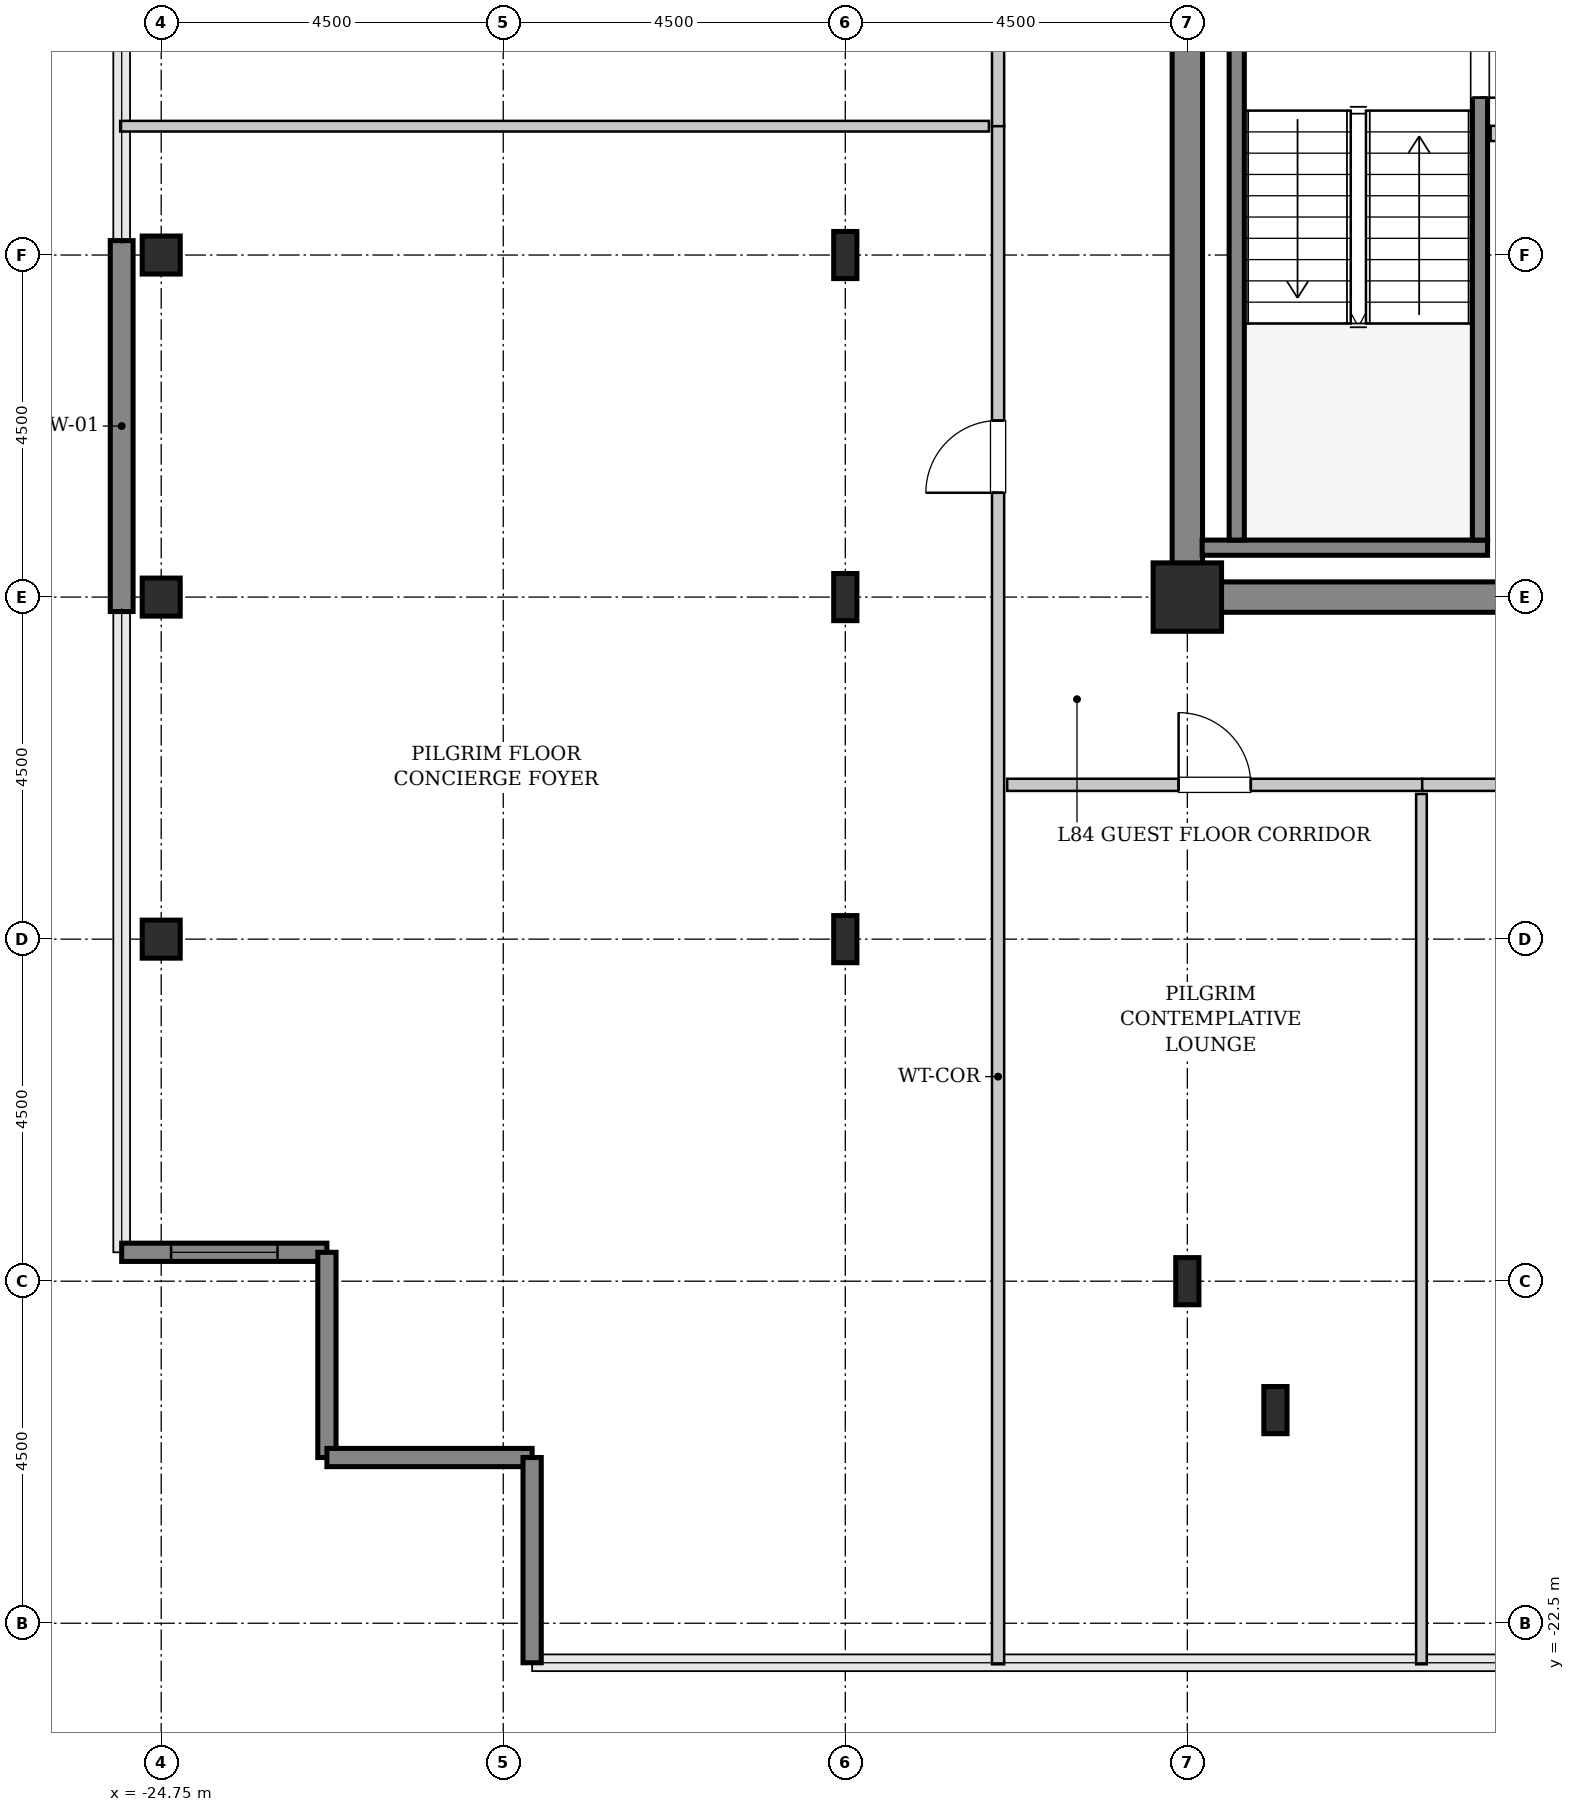
"""IFC4 building model, lengths in metres.
Left out: names, types, materials, properties, quantities, classifications, styles, units other than length and angle.
Written with IfcOpenShell. Run it as: python <this file> out.ifc"""

import sys

from ifc_helpers import new_model, si_unit, direction, frame, frame_2d, origin, origin_2d, place, context, subcontext, project, spatial, rectangle, hollow_rectangle, i_section, extrude, source, transform, mapped, element, fill, save


model = new_model("IFC4")
c1 = context("Model", 3, precision=1e-05, world=origin(), true_north=direction((0.0, 1.0)))
c2 = subcontext(c1, "Body", "Model", "MODEL_VIEW")
j1 = project(units=[si_unit("LENGTHUNIT", "METRE"), si_unit("PLANEANGLEUNIT", "RADIAN")], contexts=[c1])
p1 = place(None, origin())
s1 = spatial("IfcSite", under=j1, at=p1, CompositionType="ELEMENT")
p2 = place(p1, origin())
s2 = spatial("IfcBuilding", under=s1, at=p2, CompositionType="ELEMENT")
p3 = place(p2, frame((0.0, 0.0, 333.8)))
s3 = spatial("IfcBuildingStorey", under=s2, at=p3, CompositionType="ELEMENT", Elevation=333.8)
m1 = source(origin(), c2, "Body", "SweptSolid", [
    extrude(rectangle(XDim=9.9, YDim=0.4, at=frame_2d((4.95, 0.0))), origin(), (0.0, 0.0, 1.0), 3.8),
])
p4 = place(p3, frame((-11.45, -9.0, 0.0), z_axis=(0.0, 0.0, 1.0), x_axis=(1.0, 0.0, 0.0)))
e1 = element("IfcWall", 1, at=p4, inside=s3, PredefinedType="SHEAR", context=c2, shape_type="MappedRepresentation", body=[
    mapped(m1, transform((0.0, 0.0, 0.0), x_axis=(1.0, 0.0, 0.0), y_axis=(0.0, 1.0, 0.0), z_axis=(0.0, 0.0, 1.0), scale=1.0)),
])
m2 = source(origin(), c2, "Body", "SweptSolid", [
    extrude(rectangle(XDim=7.45, YDim=0.4, at=frame_2d((3.725, 0.0))), origin(), (0.0, 0.0, 1.0), 3.8),
])
p5 = place(p3, frame((-11.25, -8.8, 0.0), z_axis=(0.0, 0.0, 1.0), x_axis=(0.0, 1.0, 0.0)))
e2 = element("IfcWall", 2, at=p5, inside=s3, PredefinedType="SHEAR", context=c2, shape_type="MappedRepresentation", body=[
    mapped(m2, transform((0.0, 0.0, 0.0), x_axis=(1.0, 0.0, 0.0), y_axis=(0.0, 1.0, 0.0), z_axis=(0.0, 0.0, 1.0), scale=1.0)),
])
m3 = source(origin(), c2, "Body", "SweptSolid", [
    extrude(hollow_rectangle(XDim=0.5, YDim=0.5, WallThickness=0.025, InnerFilletRadius=0.025, OuterFilletRadius=0.05, at=origin_2d()), origin(), (0.0, 0.0, 1.0), 3.8),
])
for number, where, z_axis, x_axis in (
    (3, (-24.75, -13.5, 0.0), (0.0, 0.0, 1.0), (1.0, 0.0, 0.0)),
    (4, (-24.75, -9.0, 0.0), (0.0, 0.0, 1.0), (1.0, 0.0, 0.0)),
    (5, (-24.75, -4.5, 0.0), (0.0, 0.0, 1.0), (1.0, 0.0, 0.0)),
):
    element("IfcColumn", number, at=place(p3, frame(where, z_axis=z_axis, x_axis=x_axis)), inside=s3, PredefinedType="COLUMN", context=c2, shape_type="MappedRepresentation", body=[
        mapped(m3, transform((0.0, 0.0, 0.0), x_axis=(1.0, 0.0, 0.0), y_axis=(0.0, 1.0, 0.0), z_axis=(0.0, 0.0, 1.0), scale=1.0)),
    ])
m4 = source(origin(), c2, "Body", "SweptSolid", [
    extrude(i_section(OverallWidth=0.305, OverallDepth=0.62, WebThickness=0.021, FlangeThickness=0.04, FilletRadius=0.027, at=origin_2d()), origin(), (0.0, 0.0, 1.0), 3.8),
])
for number, where, z_axis, x_axis in (
    (6, (-15.75, -13.5, 0.0), (0.0, 0.0, 1.0), (1.0, 0.0, 0.0)),
    (7, (-15.75, -9.0, 0.0), (0.0, 0.0, 1.0), (1.0, 0.0, 0.0)),
    (8, (-15.75, -4.5, 0.0), (0.0, 0.0, 1.0), (1.0, 0.0, 0.0)),
    (9, (-11.25, -18.0, 0.0), (0.0, 0.0, 1.0), (1.0, 0.0, 0.0)),
):
    element("IfcColumn", number, at=place(p3, frame(where, z_axis=z_axis, x_axis=x_axis)), inside=s3, PredefinedType="COLUMN", context=c2, shape_type="MappedRepresentation", body=[
        mapped(m4, transform((0.0, 0.0, 0.0), x_axis=(1.0, 0.0, 0.0), y_axis=(0.0, 1.0, 0.0), z_axis=(0.0, 0.0, 1.0), scale=1.0)),
    ])
m5 = source(origin(), c2, "Body", "SweptSolid", [
    extrude(rectangle(XDim=0.9, YDim=0.9, at=origin_2d()), origin(), (0.0, 0.0, 1.0), 3.8),
])
p6 = place(p3, frame((-11.25, -9.0, 0.0), z_axis=(0.0, 0.0, 1.0), x_axis=(1.0, 0.0, 0.0)))
e10 = element("IfcColumn", 10, at=p6, inside=s3, PredefinedType="COLUMN", context=c2, shape_type="MappedRepresentation", body=[
    mapped(m5, transform((0.0, 0.0, 0.0), x_axis=(1.0, 0.0, 0.0), y_axis=(0.0, 1.0, 0.0), z_axis=(0.0, 0.0, 1.0), scale=1.0)),
])
p7 = place(p3, frame((-10.091, -19.696, 0.0), z_axis=(0.0, 0.0, 1.0), x_axis=(1.0, 0.0, 0.0)))
e11 = element("IfcColumn", 11, at=p7, inside=s3, PredefinedType="COLUMN", context=c2, shape_type="MappedRepresentation", body=[
    mapped(m4, transform((0.0, 0.0, 0.0), x_axis=(1.0, 0.0, 0.0), y_axis=(0.0, 1.0, 0.0), z_axis=(0.0, 0.0, 1.0), scale=1.0)),
])
m6 = source(origin(), c2, "Body", "SweptSolid", [
    extrude(rectangle(XDim=4.88, YDim=0.3, at=frame_2d((2.44, 0.0))), origin(), (0.0, 0.0, 1.0), 3.55),
])
p8 = place(p3, frame((-25.27, -9.19, 0.0), z_axis=(0.0, 0.0, 1.0), x_axis=(0.0, 1.0, 0.0)))
e12 = element("IfcWall", 12, at=p8, inside=s3, PredefinedType="SHEAR", context=c2, shape_type="MappedRepresentation", body=[
    mapped(m6, transform((0.0, 0.0, 0.0), x_axis=(1.0, 0.0, 0.0), y_axis=(0.0, 1.0, 0.0), z_axis=(0.0, 0.0, 1.0), scale=1.0)),
])
m7 = source(origin(), c2, "Body", "SweptSolid", [
    extrude(rectangle(XDim=2.7, YDim=0.24, at=frame_2d((1.35, 0.0))), origin(), (0.0, 0.0, 1.0), 3.55),
])
p9 = place(p3, frame((-25.27, -17.62, 0.0), z_axis=(0.0, 0.0, 1.0), x_axis=(1.0, 0.0, 0.0)))
e13 = element("IfcWall", 13, at=p9, inside=s3, PredefinedType="SHEAR", context=c2, shape_type="MappedRepresentation", body=[
    mapped(m7, transform((0.0, 0.0, 0.0), x_axis=(1.0, 0.0, 0.0), y_axis=(0.0, 1.0, 0.0), z_axis=(0.0, 0.0, 1.0), scale=1.0)),
])
p10 = place(p9, frame((0.65, 0.0, 0.85)))
e14 = element("IfcOpeningElement", 14, at=p10, cuts=e13, PredefinedType="OPENING", context=c2, shape_type="SweptSolid", body=[
    extrude(rectangle(XDim=1.4, YDim=1.8, at=frame_2d((0.7, 0.9))), frame((0.0, 0.13, 0.0), z_axis=(0.0, -1.0, 0.0), x_axis=(1.0, 0.0, 0.0)), (0.0, 0.0, 1.0), 0.26),
])
for number, where, z_axis, x_axis in (
    (15, (-22.57, -17.62, 0.0), (0.0, 0.0, 1.0), (0.0, -1.0, 0.0)),
    (16, (-22.57, -20.32, 0.0), (0.0, 0.0, 1.0), (1.0, 0.0, 0.0)),
    (17, (-19.87, -20.32, 0.0), (0.0, 0.0, 1.0), (0.0, -1.0, 0.0)),
):
    element("IfcWall", number, at=place(p3, frame(where, z_axis=z_axis, x_axis=x_axis)), inside=s3, PredefinedType="SHEAR", context=c2, shape_type="MappedRepresentation", body=[
        mapped(m7, transform((0.0, 0.0, 0.0), x_axis=(1.0, 0.0, 0.0), y_axis=(0.0, 1.0, 0.0), z_axis=(0.0, 0.0, 1.0), scale=1.0)),
    ])
m8 = source(origin(), c2, "Body", "SweptSolid", [
    extrude(rectangle(XDim=3.755, YDim=0.2, at=frame_2d((1.877, 0.0))), origin(), (0.0, 0.0, 1.0), 3.8),
])
p11 = place(p3, frame((-11.055, -8.35, 0.0), z_axis=(0.0, 0.0, 1.0), x_axis=(1.0, 0.0, 0.0)))
e18 = element("IfcWall", 18, at=p11, inside=s3, PredefinedType="SOLIDWALL", context=c2, shape_type="MappedRepresentation", body=[
    mapped(m8, transform((0.0, 0.0, 0.0), x_axis=(1.0, 0.0, 0.0), y_axis=(0.0, 1.0, 0.0), z_axis=(0.0, 0.0, 1.0), scale=1.0)),
])
m9 = source(origin(), c2, "Body", "SweptSolid", [
    extrude(rectangle(XDim=7.1, YDim=0.2, at=frame_2d((3.55, 0.0))), origin(), (0.0, 0.0, 1.0), 3.8),
])
p12 = place(p3, frame((-10.6, -1.15, 0.0), z_axis=(0.0, 0.0, 1.0), x_axis=(0.0, -1.0, 0.0)))
e19 = element("IfcWall", 19, at=p12, inside=s3, PredefinedType="SOLIDWALL", context=c2, shape_type="MappedRepresentation", body=[
    mapped(m9, transform((0.0, 0.0, 0.0), x_axis=(1.0, 0.0, 0.0), y_axis=(0.0, 1.0, 0.0), z_axis=(0.0, 0.0, 1.0), scale=1.0)),
])
p13 = place(p3, frame((-7.4, -1.15, 0.0), z_axis=(0.0, 0.0, 1.0), x_axis=(0.0, -1.0, 0.0)))
e20 = element("IfcWall", 20, at=p13, inside=s3, PredefinedType="SOLIDWALL", context=c2, shape_type="MappedRepresentation", body=[
    mapped(m9, transform((0.0, 0.0, 0.0), x_axis=(1.0, 0.0, 0.0), y_axis=(0.0, 1.0, 0.0), z_axis=(0.0, 0.0, 1.0), scale=1.0)),
])
p14 = place(p13, frame((0.18, 0.0, 0.0)))
e21 = element("IfcOpeningElement", 21, at=p14, cuts=e20, PredefinedType="OPENING", context=c2, shape_type="SweptSolid", body=[
    extrude(rectangle(XDim=1.1, YDim=2.15, at=frame_2d((0.55, 1.075))), frame((0.0, 0.11, 0.0), z_axis=(0.0, -1.0, 0.0), x_axis=(1.0, 0.0, 0.0)), (0.0, 0.0, 1.0), 0.22),
])
m10 = source(origin(), c2, "Body", "SweptSolid", [
    extrude(rectangle(XDim=2.9, YDim=0.2, at=frame_2d((1.45, 0.0))), origin(), (0.0, 0.0, 1.0), 3.535),
])
p15 = place(p3, frame((-7.26, -2.9, 0.0), z_axis=(0.0, 0.0, 1.0), x_axis=(1.0, 0.0, 0.0)))
e22 = element("IfcWall", 22, at=p15, inside=s3, PredefinedType="PARTITIONING", context=c2, shape_type="MappedRepresentation", body=[
    mapped(m10, transform((0.0, 0.0, 0.0), x_axis=(1.0, 0.0, 0.0), y_axis=(0.0, 1.0, 0.0), z_axis=(0.0, 0.0, 1.0), scale=1.0)),
])
m11 = source(origin(), c2, "Body", "SweptSolid", [
    extrude(rectangle(XDim=20.245, YDim=0.16, at=frame_2d((10.123, 0.0))), origin(), (0.0, 0.0, 1.0), 3.535),
])
p16 = place(p3, frame((-13.74, -23.04, 0.0), z_axis=(0.0, 0.0, 1.0), x_axis=(0.0, 1.0, 0.0)))
e23 = element("IfcWall", 23, at=p16, inside=s3, PredefinedType="PARTITIONING", context=c2, shape_type="MappedRepresentation", body=[
    mapped(m11, transform((0.0, 0.0, 0.0), x_axis=(1.0, 0.0, 0.0), y_axis=(0.0, 1.0, 0.0), z_axis=(0.0, 0.0, 1.0), scale=1.0)),
])
p17 = place(p16, frame((15.413, 0.0, 0.0)))
e24 = element("IfcOpeningElement", 24, at=p17, cuts=e23, PredefinedType="OPENING", context=c2, shape_type="SweptSolid", body=[
    extrude(rectangle(XDim=0.95, YDim=2.1, at=frame_2d((0.475, 1.05))), frame((0.0, 0.09, 0.0), z_axis=(0.0, -1.0, 0.0), x_axis=(1.0, 0.0, 0.0)), (0.0, 0.0, 1.0), 0.18),
])
m12 = source(origin(), c2, "Body", "SweptSolid", [
    extrude(rectangle(XDim=11.43, YDim=0.14, at=frame_2d((5.715, 0.0))), origin(), (0.0, 0.0, 1.0), 3.535),
])
p18 = place(p3, frame((-25.29, -2.805, 0.0), z_axis=(0.0, 0.0, 1.0), x_axis=(1.0, 0.0, 0.0)))
e25 = element("IfcWall", 25, at=p18, inside=s3, PredefinedType="PARTITIONING", context=c2, shape_type="MappedRepresentation", body=[
    mapped(m12, transform((0.0, 0.0, 0.0), x_axis=(1.0, 0.0, 0.0), y_axis=(0.0, 1.0, 0.0), z_axis=(0.0, 0.0, 1.0), scale=1.0)),
])
m13 = source(origin(), c2, "Body", "SweptSolid", [
    extrude(rectangle(XDim=6.446, YDim=0.16, at=frame_2d((3.223, 0.0))), origin(), (0.0, 0.0, 1.0), 3.535),
])
p19 = place(p3, frame((-13.74, -2.805, 0.0), z_axis=(0.0, 0.0, 1.0), x_axis=(0.0, 1.0, 0.0)))
e26 = element("IfcWall", 26, at=p19, inside=s3, PredefinedType="PARTITIONING", context=c2, shape_type="MappedRepresentation", body=[
    mapped(m13, transform((0.0, 0.0, 0.0), x_axis=(1.0, 0.0, 0.0), y_axis=(0.0, 1.0, 0.0), z_axis=(0.0, 0.0, 1.0), scale=1.0)),
])
p20 = place(p19, frame((2.748, 0.0, 0.0)))
e27 = element("IfcOpeningElement", 27, at=p20, cuts=e26, PredefinedType="OPENING", context=c2, shape_type="SweptSolid", body=[
    extrude(rectangle(XDim=0.95, YDim=2.1, at=frame_2d((0.475, 1.05))), frame((0.0, 0.09, 0.0), z_axis=(0.0, -1.0, 0.0), x_axis=(1.0, 0.0, 0.0)), (0.0, 0.0, 1.0), 0.18),
])
m14 = source(origin(), c2, "Body", "SweptSolid", [
    extrude(rectangle(XDim=5.46, YDim=0.16, at=frame_2d((2.73, 0.0))), origin(), (0.0, 0.0, 1.0), 3.535),
])
p21 = place(p3, frame((-13.62, -11.47, 0.0), z_axis=(0.0, 0.0, 1.0), x_axis=(1.0, 0.0, 0.0)))
e28 = element("IfcWall", 28, at=p21, inside=s3, PredefinedType="PARTITIONING", context=c2, shape_type="MappedRepresentation", body=[
    mapped(m14, transform((0.0, 0.0, 0.0), x_axis=(1.0, 0.0, 0.0), y_axis=(0.0, 1.0, 0.0), z_axis=(0.0, 0.0, 1.0), scale=1.0)),
])
p22 = place(p21, frame((2.255, 0.0, 0.0)))
e29 = element("IfcOpeningElement", 29, at=p22, cuts=e28, PredefinedType="OPENING", context=c2, shape_type="SweptSolid", body=[
    extrude(rectangle(XDim=0.95, YDim=2.1, at=frame_2d((0.475, 1.05))), frame((0.0, 0.09, 0.0), z_axis=(0.0, -1.0, 0.0), x_axis=(1.0, 0.0, 0.0)), (0.0, 0.0, 1.0), 0.18),
])
m15 = source(origin(), c2, "Body", "SweptSolid", [
    extrude(rectangle(XDim=11.45, YDim=0.14, at=frame_2d((5.725, 0.0))), origin(), (0.0, 0.0, 1.0), 3.535),
])
p23 = place(p3, frame((-8.17, -23.04, 0.0), z_axis=(0.0, 0.0, 1.0), x_axis=(0.0, 1.0, 0.0)))
e30 = element("IfcWall", 30, at=p23, inside=s3, PredefinedType="PARTITIONING", context=c2, shape_type="MappedRepresentation", body=[
    mapped(m15, transform((0.0, 0.0, 0.0), x_axis=(1.0, 0.0, 0.0), y_axis=(0.0, 1.0, 0.0), z_axis=(0.0, 0.0, 1.0), scale=1.0)),
])
m16 = source(origin(), c2, "Body", "SweptSolid", [
    extrude(rectangle(XDim=5.565, YDim=0.16, at=frame_2d((2.782, 0.0))), origin(), (0.0, 0.0, 1.0), 3.535),
])
p24 = place(p3, frame((-8.16, -11.47, 0.0), z_axis=(0.0, 0.0, 1.0), x_axis=(1.0, 0.0, 0.0)))
e31 = element("IfcWall", 31, at=p24, inside=s3, PredefinedType="PARTITIONING", context=c2, shape_type="MappedRepresentation", body=[
    mapped(m16, transform((0.0, 0.0, 0.0), x_axis=(1.0, 0.0, 0.0), y_axis=(0.0, 1.0, 0.0), z_axis=(0.0, 0.0, 1.0), scale=1.0)),
])
p25 = place(p24, frame((2.308, 0.0, 0.0)))
e32 = element("IfcOpeningElement", 32, at=p25, cuts=e31, PredefinedType="OPENING", context=c2, shape_type="SweptSolid", body=[
    extrude(rectangle(XDim=0.95, YDim=2.1, at=frame_2d((0.475, 1.05))), frame((0.0, 0.09, 0.0), z_axis=(0.0, -1.0, 0.0), x_axis=(1.0, 0.0, 0.0)), (0.0, 0.0, 1.0), 0.18),
])
m17 = source(origin(), c2, "Body", "SweptSolid", [
    extrude(rectangle(XDim=1.4, YDim=1.8, at=frame_2d((0.7, 0.9))), frame((0.0, 0.03, 0.0), z_axis=(0.0, -1.0, 0.0), x_axis=(1.0, 0.0, 0.0)), (0.0, 0.0, 1.0), 0.06),
])
p26 = place(p10, origin())
e33 = element("IfcWindow", 33, at=p26, inside=s3, PartitioningType="SINGLE_PANEL", PredefinedType="WINDOW", context=c2, shape_type="MappedRepresentation", body=[
    mapped(m17, transform((0.0, 0.0, 0.0), x_axis=(1.0, 0.0, 0.0), y_axis=(0.0, 1.0, 0.0), z_axis=(0.0, 0.0, 1.0), scale=1.0)),
])
fill(e14, e33)
m18 = source(origin(), c2, "Body", "SweptSolid", [
    extrude(rectangle(XDim=1.1, YDim=2.15, at=frame_2d((0.55, 1.075))), frame((0.0, 0.025, 0.0), z_axis=(0.0, -1.0, 0.0), x_axis=(1.0, 0.0, 0.0)), (0.0, 0.0, 1.0), 0.05),
])
p27 = place(p14, origin())
e34 = element("IfcDoor", 34, at=p27, inside=s3, OperationType="SINGLE_SWING_RIGHT", PredefinedType="DOOR", context=c2, shape_type="MappedRepresentation", body=[
    mapped(m18, transform((0.0, 0.0, 0.0), x_axis=(1.0, 0.0, 0.0), y_axis=(0.0, 1.0, 0.0), z_axis=(0.0, 0.0, 1.0), scale=1.0)),
])
fill(e21, e34)
m19 = source(origin(), c2, "Body", "SweptSolid", [
    extrude(rectangle(XDim=0.95, YDim=2.1, at=frame_2d((0.475, 1.05))), frame((0.0, 0.025, 0.0), z_axis=(0.0, -1.0, 0.0), x_axis=(1.0, 0.0, 0.0)), (0.0, 0.0, 1.0), 0.05),
])
p28 = place(p17, origin())
e35 = element("IfcDoor", 35, at=p28, inside=s3, OperationType="SINGLE_SWING_LEFT", PredefinedType="DOOR", context=c2, shape_type="MappedRepresentation", body=[
    mapped(m19, transform((0.0, 0.0, 0.0), x_axis=(1.0, 0.0, 0.0), y_axis=(0.0, 1.0, 0.0), z_axis=(0.0, 0.0, 1.0), scale=1.0)),
])
fill(e24, e35)
p29 = place(p22, origin())
e36 = element("IfcDoor", 36, at=p29, inside=s3, OperationType="SINGLE_SWING_LEFT", PredefinedType="DOOR", context=c2, shape_type="MappedRepresentation", body=[
    mapped(m19, transform((0.0, 0.0, 0.0), x_axis=(1.0, 0.0, 0.0), y_axis=(0.0, 1.0, 0.0), z_axis=(0.0, 0.0, 1.0), scale=1.0)),
])
fill(e29, e36)
save(model, sys.argv[1])
